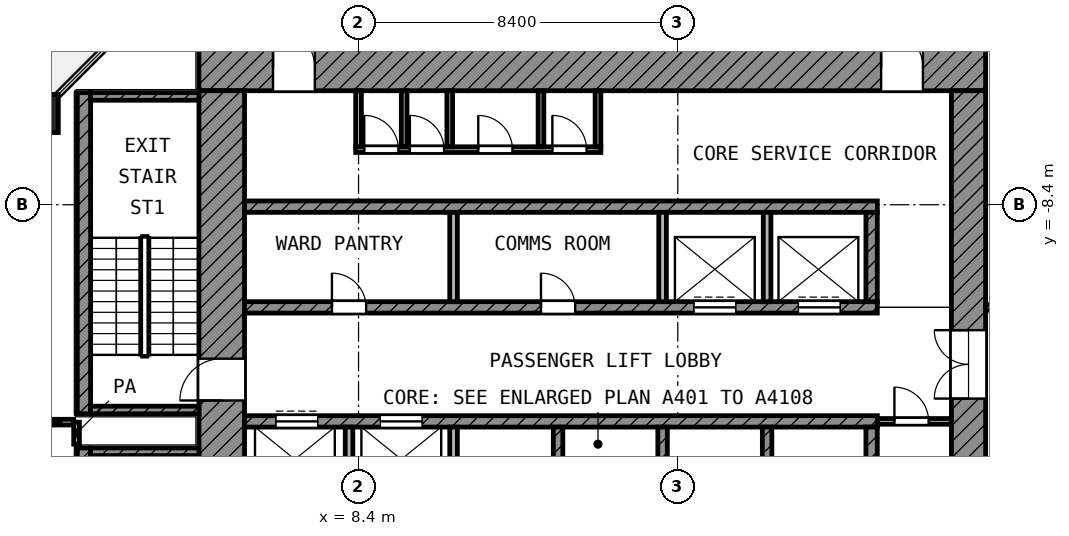
"""IFC4 building model, lengths in metres.
Left out: names, types, materials, properties, quantities, classifications, styles, units other than length and angle.
Written with IfcOpenShell. Run it as: python <this file> out.ifc"""

import sys

from ifc_helpers import new_model, si_unit, direction, frame, frame_2d, origin, origin_2d, place, context, subcontext, project, spatial, rectangle, extrude, element, fill, save


model = new_model("IFC4")
c1 = context("Model", 3, precision=1e-05, world=origin(), true_north=direction((0.0, 1.0)))
c2 = subcontext(c1, "Body", "Model", "MODEL_VIEW")
j1 = project(units=[si_unit("LENGTHUNIT", "METRE"), si_unit("PLANEANGLEUNIT", "RADIAN")], contexts=[c1])
p1 = place(None, origin())
s1 = spatial("IfcSite", under=j1, at=p1, CompositionType="ELEMENT")
p2 = place(p1, origin())
s2 = spatial("IfcBuilding", under=s1, at=p2, CompositionType="ELEMENT")
p3 = place(p2, frame((0.0, 0.0, 183.6)))
s3 = spatial("IfcBuildingStorey", under=s2, at=p3, CompositionType="ELEMENT", Elevation=183.6)
p4 = place(p3, frame((0.0, -6.0, 0.0), z_axis=(0.0, 0.0, 1.0), x_axis=(1.0, 0.0, 0.0)))
e1 = element("IfcColumn", 1, at=p4, inside=s3, PredefinedType="COLUMN", context=c2, shape_type="SweptSolid", body=[
    extrude(rectangle(XDim=1.0, YDim=1.0, at=origin_2d()), origin(), (0.0, 0.0, 1.0), 4.2),
])
p5 = place(p3, frame((4.2, -4.8, 0.0), z_axis=(0.0, 0.0, 1.0), x_axis=(1.0, 0.0, 0.0)))
e2 = element("IfcWall", 2, at=p5, inside=s3, PredefinedType="SHEAR", context=c2, shape_type="SweptSolid", body=[
    extrude(rectangle(XDim=20.7, YDim=1.2, at=frame_2d((10.35, 0.0))), origin(), (0.0, 0.0, 1.0), 3.6),
])
p6 = place(p5, frame((1.95, 0.0, 0.0)))
e3 = element("IfcOpeningElement", 3, at=p6, cuts=e2, PredefinedType="OPENING", context=c2, shape_type="SweptSolid", body=[
    extrude(rectangle(XDim=1.1, YDim=2.1, at=frame_2d((0.55, 1.05))), frame((0.0, 0.61, 0.0), z_axis=(0.0, -1.0, 0.0), x_axis=(1.0, 0.0, 0.0)), (0.0, 0.0, 1.0), 1.22),
])
p7 = place(p5, frame((17.95, 0.0, 0.0)))
e4 = element("IfcOpeningElement", 4, at=p7, cuts=e2, PredefinedType="OPENING", context=c2, shape_type="SweptSolid", body=[
    extrude(rectangle(XDim=1.1, YDim=2.1, at=frame_2d((0.55, 1.05))), frame((0.0, 0.61, 0.0), z_axis=(0.0, -1.0, 0.0), x_axis=(1.0, 0.0, 0.0)), (0.0, 0.0, 1.0), 1.22),
])
p8 = place(p3, frame((4.8, -24.9, 0.0), z_axis=(0.0, 0.0, 1.0), x_axis=(0.0, 1.0, 0.0)))
e5 = element("IfcWall", 5, at=p8, inside=s3, PredefinedType="SHEAR", context=c2, shape_type="SweptSolid", body=[
    extrude(rectangle(XDim=19.5, YDim=1.2, at=frame_2d((9.75, 0.0))), origin(), (0.0, 0.0, 1.0), 3.6),
])
p9 = place(p8, frame((11.35, 0.0, 0.0)))
e6 = element("IfcOpeningElement", 6, at=p9, cuts=e5, PredefinedType="OPENING", context=c2, shape_type="SweptSolid", body=[
    extrude(rectangle(XDim=1.1, YDim=2.1, at=frame_2d((0.55, 1.05))), frame((0.0, 0.61, 0.0), z_axis=(0.0, -1.0, 0.0), x_axis=(1.0, 0.0, 0.0)), (0.0, 0.0, 1.0), 1.22),
])
p10 = place(p8, frame((2.05, 0.0, 0.0)))
e7 = element("IfcOpeningElement", 7, at=p10, cuts=e5, PredefinedType="OPENING", context=c2, shape_type="SweptSolid", body=[
    extrude(rectangle(XDim=1.1, YDim=2.1, at=frame_2d((0.55, 1.05))), frame((0.0, 0.61, 0.0), z_axis=(0.0, -1.0, 0.0), x_axis=(1.0, 0.0, 0.0)), (0.0, 0.0, 1.0), 1.22),
])
p11 = place(p3, frame((24.45, -24.0, 0.0), z_axis=(0.0, 0.0, 1.0), x_axis=(0.0, 1.0, 0.0)))
e8 = element("IfcWall", 8, at=p11, inside=s3, PredefinedType="SHEAR", context=c2, shape_type="SweptSolid", body=[
    extrude(rectangle(XDim=18.6, YDim=0.9, at=frame_2d((9.3, 0.0))), origin(), (0.0, 0.0, 1.0), 3.6),
])
p12 = place(p11, frame((10.5, 0.0, 0.0)))
e9 = element("IfcOpeningElement", 9, at=p12, cuts=e8, PredefinedType="OPENING", context=c2, shape_type="SweptSolid", body=[
    extrude(rectangle(XDim=1.8, YDim=2.1, at=frame_2d((0.9, 1.05))), frame((0.0, 0.46, 0.0), z_axis=(0.0, -1.0, 0.0), x_axis=(1.0, 0.0, 0.0)), (0.0, 0.0, 1.0), 0.92),
])
p13 = place(p3, frame((5.4, -8.45, 0.0), z_axis=(0.0, 0.0, 1.0), x_axis=(1.0, 0.0, 0.0)))
e10 = element("IfcWall", 10, at=p13, inside=s3, PredefinedType="SHEAR", context=c2, shape_type="SweptSolid", body=[
    extrude(rectangle(XDim=16.65, YDim=0.3, at=frame_2d((8.325, 0.0))), origin(), (0.0, 0.0, 1.0), 3.6),
])
p14 = place(p3, frame((5.4, -11.1, 0.0), z_axis=(0.0, 0.0, 1.0), x_axis=(1.0, 0.0, 0.0)))
e11 = element("IfcWall", 11, at=p14, inside=s3, PredefinedType="SHEAR", context=c2, shape_type="SweptSolid", body=[
    extrude(rectangle(XDim=16.65, YDim=0.3, at=frame_2d((8.325, 0.0))), origin(), (0.0, 0.0, 1.0), 3.6),
])
p15 = place(p14, frame((11.825, 0.0, 0.0)))
e12 = element("IfcOpeningElement", 12, at=p15, cuts=e11, PredefinedType="OPENING", context=c2, shape_type="SweptSolid", body=[
    extrude(rectangle(XDim=1.1, YDim=2.1, at=frame_2d((0.55, 1.05))), frame((0.0, 0.16, 0.0), z_axis=(0.0, -1.0, 0.0), x_axis=(1.0, 0.0, 0.0)), (0.0, 0.0, 1.0), 0.32),
])
p16 = place(p14, frame((14.575, 0.0, 0.0)))
e13 = element("IfcOpeningElement", 13, at=p16, cuts=e11, PredefinedType="OPENING", context=c2, shape_type="SweptSolid", body=[
    extrude(rectangle(XDim=1.1, YDim=2.1, at=frame_2d((0.55, 1.05))), frame((0.0, 0.16, 0.0), z_axis=(0.0, -1.0, 0.0), x_axis=(1.0, 0.0, 0.0)), (0.0, 0.0, 1.0), 0.32),
])
p17 = place(p14, frame((2.3, 0.0, 0.0)))
e14 = element("IfcOpeningElement", 14, at=p17, cuts=e11, PredefinedType="OPENING", context=c2, shape_type="SweptSolid", body=[
    extrude(rectangle(XDim=0.9, YDim=2.1, at=frame_2d((0.45, 1.05))), frame((0.0, 0.16, 0.0), z_axis=(0.0, -1.0, 0.0), x_axis=(1.0, 0.0, 0.0)), (0.0, 0.0, 1.0), 0.32),
])
p18 = place(p14, frame((7.8, 0.0, 0.0)))
e15 = element("IfcOpeningElement", 15, at=p18, cuts=e11, PredefinedType="OPENING", context=c2, shape_type="SweptSolid", body=[
    extrude(rectangle(XDim=0.9, YDim=2.1, at=frame_2d((0.45, 1.05))), frame((0.0, 0.16, 0.0), z_axis=(0.0, -1.0, 0.0), x_axis=(1.0, 0.0, 0.0)), (0.0, 0.0, 1.0), 0.32),
])
p19 = place(p3, frame((5.4, -14.1, 0.0), z_axis=(0.0, 0.0, 1.0), x_axis=(1.0, 0.0, 0.0)))
e16 = element("IfcWall", 16, at=p19, inside=s3, PredefinedType="SHEAR", context=c2, shape_type="SweptSolid", body=[
    extrude(rectangle(XDim=16.65, YDim=0.3, at=frame_2d((8.325, 0.0))), origin(), (0.0, 0.0, 1.0), 3.6),
])
p20 = place(p19, frame((0.825, 0.0, 0.0)))
e17 = element("IfcOpeningElement", 17, at=p20, cuts=e16, PredefinedType="OPENING", context=c2, shape_type="SweptSolid", body=[
    extrude(rectangle(XDim=1.1, YDim=2.1, at=frame_2d((0.55, 1.05))), frame((0.0, 0.16, 0.0), z_axis=(0.0, -1.0, 0.0), x_axis=(1.0, 0.0, 0.0)), (0.0, 0.0, 1.0), 0.32),
])
p21 = place(p19, frame((3.575, 0.0, 0.0)))
e18 = element("IfcOpeningElement", 18, at=p21, cuts=e16, PredefinedType="OPENING", context=c2, shape_type="SweptSolid", body=[
    extrude(rectangle(XDim=1.1, YDim=2.1, at=frame_2d((0.55, 1.05))), frame((0.0, 0.16, 0.0), z_axis=(0.0, -1.0, 0.0), x_axis=(1.0, 0.0, 0.0)), (0.0, 0.0, 1.0), 0.32),
])
p22 = place(p3, frame((21.9, -10.95, 0.0), z_axis=(0.0, 0.0, 1.0), x_axis=(0.0, 1.0, 0.0)))
e19 = element("IfcWall", 19, at=p22, inside=s3, PredefinedType="SHEAR", context=c2, shape_type="SweptSolid", body=[
    extrude(rectangle(XDim=2.35, YDim=0.3, at=frame_2d((1.175, 0.0))), origin(), (0.0, 0.0, 1.0), 3.6),
])
p23 = place(p3, frame((21.9, -16.6, 0.0), z_axis=(0.0, 0.0, 1.0), x_axis=(0.0, 1.0, 0.0)))
e20 = element("IfcWall", 20, at=p23, inside=s3, PredefinedType="SHEAR", context=c2, shape_type="SweptSolid", body=[
    extrude(rectangle(XDim=2.35, YDim=0.3, at=frame_2d((1.175, 0.0))), origin(), (0.0, 0.0, 1.0), 3.6),
])
for number, where, z_axis, x_axis in (
    (21, (10.9, -10.95, 0.0), (0.0, 0.0, 1.0), (0.0, 1.0, 0.0)),
    (22, (16.4, -10.95, 0.0), (0.0, 0.0, 1.0), (0.0, 1.0, 0.0)),
    (23, (19.15, -10.95, 0.0), (0.0, 0.0, 1.0), (0.0, 1.0, 0.0)),
):
    element("IfcWall", number, at=place(p3, frame(where, z_axis=z_axis, x_axis=x_axis)), inside=s3, PredefinedType="PARTITIONING", context=c2, shape_type="SweptSolid", body=[
        extrude(rectangle(XDim=2.35, YDim=0.2, at=frame_2d((1.175, 0.0))), origin(), (0.0, 0.0, 1.0), 3.6),
    ])
for number, where, z_axis, x_axis in (
    (24, (8.15, -16.6, 0.0), (0.0, 0.0, 1.0), (0.0, 1.0, 0.0)),
    (25, (10.9, -16.6, 0.0), (0.0, 0.0, 1.0), (0.0, 1.0, 0.0)),
):
    element("IfcWall", number, at=place(p3, frame(where, z_axis=z_axis, x_axis=x_axis)), inside=s3, PredefinedType="PARTITIONING", context=c2, shape_type="SweptSolid", body=[
        extrude(rectangle(XDim=2.35, YDim=0.2, at=frame_2d((1.175, 0.0))), origin(), (0.0, 0.0, 1.0), 3.6),
    ])
for number, where, z_axis, x_axis in (
    (26, (13.65, -16.6, 0.0), (0.0, 0.0, 1.0), (0.0, 1.0, 0.0)),
    (27, (16.4, -16.6, 0.0), (0.0, 0.0, 1.0), (0.0, 1.0, 0.0)),
    (28, (19.15, -16.6, 0.0), (0.0, 0.0, 1.0), (0.0, 1.0, 0.0)),
):
    element("IfcWall", number, at=place(p3, frame(where, z_axis=z_axis, x_axis=x_axis)), inside=s3, PredefinedType="SHEAR", context=c2, shape_type="SweptSolid", body=[
        extrude(rectangle(XDim=2.35, YDim=0.25, at=frame_2d((1.175, 0.0))), origin(), (0.0, 0.0, 1.0), 3.6),
    ])
p24 = place(p3, frame((22.05, -14.1, 0.0), z_axis=(0.0, 0.0, 1.0), x_axis=(1.0, 0.0, 0.0)))
e29 = element("IfcWall", 29, at=p24, inside=s3, PredefinedType="PARTITIONING", context=c2, shape_type="SweptSolid", body=[
    extrude(rectangle(XDim=1.95, YDim=0.15, at=frame_2d((0.975, 0.0))), origin(), (0.0, 0.0, 1.0), 3.6),
])
p25 = place(p24, frame((0.45, 0.0, 0.0)))
e30 = element("IfcOpeningElement", 30, at=p25, cuts=e29, PredefinedType="OPENING", context=c2, shape_type="SweptSolid", body=[
    extrude(rectangle(XDim=0.9, YDim=2.1, at=frame_2d((0.45, 1.05))), frame((0.0, 0.085, 0.0), z_axis=(0.0, -1.0, 0.0), x_axis=(1.0, 0.0, 0.0)), (0.0, 0.0, 1.0), 0.17),
])
p26 = place(p3, frame((8.325, -6.95, 0.0), z_axis=(0.0, 0.0, 1.0), x_axis=(1.0, 0.0, 0.0)))
e31 = element("IfcWall", 31, at=p26, inside=s3, PredefinedType="PARTITIONING", context=c2, shape_type="SweptSolid", body=[
    extrude(rectangle(XDim=6.45, YDim=0.15, at=frame_2d((3.225, 0.0))), origin(), (0.0, 0.0, 1.0), 3.6),
])
p27 = place(p26, frame((0.225, 0.0, 0.0)))
e32 = element("IfcOpeningElement", 32, at=p27, cuts=e31, PredefinedType="OPENING", context=c2, shape_type="SweptSolid", body=[
    extrude(rectangle(XDim=0.9, YDim=2.1, at=frame_2d((0.45, 1.05))), frame((0.0, 0.085, 0.0), z_axis=(0.0, -1.0, 0.0), x_axis=(1.0, 0.0, 0.0)), (0.0, 0.0, 1.0), 0.17),
])
p28 = place(p26, frame((1.425, 0.0, 0.0)))
e33 = element("IfcOpeningElement", 33, at=p28, cuts=e31, PredefinedType="OPENING", context=c2, shape_type="SweptSolid", body=[
    extrude(rectangle(XDim=0.9, YDim=2.1, at=frame_2d((0.45, 1.05))), frame((0.0, 0.085, 0.0), z_axis=(0.0, -1.0, 0.0), x_axis=(1.0, 0.0, 0.0)), (0.0, 0.0, 1.0), 0.17),
])
p29 = place(p26, frame((3.225, 0.0, 0.0)))
e34 = element("IfcOpeningElement", 34, at=p29, cuts=e31, PredefinedType="OPENING", context=c2, shape_type="SweptSolid", body=[
    extrude(rectangle(XDim=0.9, YDim=2.1, at=frame_2d((0.45, 1.05))), frame((0.0, 0.085, 0.0), z_axis=(0.0, -1.0, 0.0), x_axis=(1.0, 0.0, 0.0)), (0.0, 0.0, 1.0), 0.17),
])
p30 = place(p26, frame((5.175, 0.0, 0.0)))
e35 = element("IfcOpeningElement", 35, at=p30, cuts=e31, PredefinedType="OPENING", context=c2, shape_type="SweptSolid", body=[
    extrude(rectangle(XDim=0.9, YDim=2.1, at=frame_2d((0.45, 1.05))), frame((0.0, 0.085, 0.0), z_axis=(0.0, -1.0, 0.0), x_axis=(1.0, 0.0, 0.0)), (0.0, 0.0, 1.0), 0.17),
])
for number, where, z_axis, x_axis in (
    (36, (8.4, -6.875, 0.0), (0.0, 0.0, 1.0), (0.0, 1.0, 0.0)),
    (37, (9.6, -6.875, 0.0), (0.0, 0.0, 1.0), (0.0, 1.0, 0.0)),
    (38, (10.8, -6.875, 0.0), (0.0, 0.0, 1.0), (0.0, 1.0, 0.0)),
    (39, (13.2, -6.875, 0.0), (0.0, 0.0, 1.0), (0.0, 1.0, 0.0)),
    (40, (14.7, -6.875, 0.0), (0.0, 0.0, 1.0), (0.0, 1.0, 0.0)),
):
    element("IfcWall", number, at=place(p3, frame(where, z_axis=z_axis, x_axis=x_axis)), inside=s3, PredefinedType="PARTITIONING", context=c2, shape_type="SweptSolid", body=[
        extrude(rectangle(XDim=1.475, YDim=0.15, at=frame_2d((0.738, 0.0))), origin(), (0.0, 0.0, 1.0), 3.6),
    ])
p31 = place(p3, frame((1.175, -13.9, 0.0), z_axis=(0.0, 0.0, 1.0), x_axis=(0.0, 1.0, 0.0)))
e41 = element("IfcWall", 41, at=p31, inside=s3, PredefinedType="SHEAR", context=c2, shape_type="SweptSolid", body=[
    extrude(rectangle(XDim=8.45, YDim=0.35, at=frame_2d((4.225, 0.0))), origin(), (0.0, 0.0, 1.0), 3.6),
])
for number, where, z_axis, x_axis in (
    (42, (1.35, -5.55, 0.0), (0.0, 0.0, 1.0), (1.0, 0.0, 0.0)),
    (43, (1.35, -13.8, 0.0), (0.0, 0.0, 1.0), (1.0, 0.0, 0.0)),
):
    element("IfcWall", number, at=place(p3, frame(where, z_axis=z_axis, x_axis=x_axis)), inside=s3, PredefinedType="SHEAR", context=c2, shape_type="SweptSolid", body=[
        extrude(rectangle(XDim=2.85, YDim=0.2, at=frame_2d((1.425, 0.0))), origin(), (0.0, 0.0, 1.0), 3.6),
    ])
p32 = place(p3, frame((1.175, -23.25, 0.0), z_axis=(0.0, 0.0, 1.0), x_axis=(0.0, 1.0, 0.0)))
e44 = element("IfcWall", 44, at=p32, inside=s3, PredefinedType="SHEAR", context=c2, shape_type="SweptSolid", body=[
    extrude(rectangle(XDim=8.45, YDim=0.35, at=frame_2d((4.225, 0.0))), origin(), (0.0, 0.0, 1.0), 3.6),
])
p33 = place(p3, frame((1.35, -14.9, 0.0), z_axis=(0.0, 0.0, 1.0), x_axis=(1.0, 0.0, 0.0)))
e45 = element("IfcWall", 45, at=p33, inside=s3, PredefinedType="SHEAR", context=c2, shape_type="SweptSolid", body=[
    extrude(rectangle(XDim=2.85, YDim=0.2, at=frame_2d((1.425, 0.0))), origin(), (0.0, 0.0, 1.0), 3.6),
])
p34 = place(p3, frame((0.08, -14.12, 0.0), z_axis=(0.0, 0.0, 1.0), x_axis=(1.0, 0.0, 0.0)))
e46 = element("IfcWall", 46, at=p34, inside=s3, PredefinedType="PARTITIONING", context=c2, shape_type="SweptSolid", body=[
    extrude(rectangle(XDim=0.824, YDim=0.15, at=frame_2d((0.412, 0.0))), origin(), (0.0, 0.0, 1.0), 3.6),
])
p35 = place(p3, frame((24.9, -11.1, 0.0), z_axis=(0.0, 0.0, 1.0), x_axis=(1.0, 0.0, 0.0)))
e47 = element("IfcWall", 47, at=p35, inside=s3, PredefinedType="PARTITIONING", context=c2, shape_type="SweptSolid", body=[
    extrude(rectangle(XDim=4.424, YDim=0.15, at=frame_2d((2.212, 0.0))), origin(), (0.0, 0.0, 1.0), 3.6),
])
p36 = place(p35, frame((1.8, 0.0, 0.0)))
e48 = element("IfcOpeningElement", 48, at=p36, cuts=e47, PredefinedType="OPENING", context=c2, shape_type="SweptSolid", body=[
    extrude(rectangle(XDim=1.2, YDim=2.1, at=frame_2d((0.6, 1.05))), frame((0.0, 0.085, 0.0), z_axis=(0.0, -1.0, 0.0), x_axis=(1.0, 0.0, 0.0)), (0.0, 0.0, 1.0), 0.17),
])
p37 = place(p3, frame((0.98, -14.7, 0.0), z_axis=(0.0, 0.0, 1.0), x_axis=(0.0, 1.0, 0.0)))
e49 = element("IfcWall", 49, at=p37, inside=s3, PredefinedType="PARTITIONING", context=c2, shape_type="SweptSolid", body=[
    extrude(rectangle(XDim=0.578, YDim=0.15, at=frame_2d((0.289, 0.0))), origin(), (0.0, 0.0, 1.0), 3.6),
])
p38 = place(p15, origin())
e50 = element("IfcDoor", 50, at=p38, inside=s3, OperationType="DOUBLE_DOOR_SLIDING", PredefinedType="DOOR", context=c2, shape_type="SweptSolid", body=[
    extrude(rectangle(XDim=1.1, YDim=2.1, at=frame_2d((0.55, 1.05))), frame((0.0, 0.025, 0.0), z_axis=(0.0, -1.0, 0.0), x_axis=(1.0, 0.0, 0.0)), (0.0, 0.0, 1.0), 0.05),
])
fill(e12, e50)
p39 = place(p16, origin())
e51 = element("IfcDoor", 51, at=p39, inside=s3, OperationType="DOUBLE_DOOR_SLIDING", PredefinedType="DOOR", context=c2, shape_type="SweptSolid", body=[
    extrude(rectangle(XDim=1.1, YDim=2.1, at=frame_2d((0.55, 1.05))), frame((0.0, 0.025, 0.0), z_axis=(0.0, -1.0, 0.0), x_axis=(1.0, 0.0, 0.0)), (0.0, 0.0, 1.0), 0.05),
])
fill(e13, e51)
p40 = place(p20, origin())
e52 = element("IfcDoor", 52, at=p40, inside=s3, OperationType="DOUBLE_DOOR_SLIDING", PredefinedType="DOOR", context=c2, shape_type="SweptSolid", body=[
    extrude(rectangle(XDim=1.1, YDim=2.1, at=frame_2d((0.55, 1.05))), frame((0.0, 0.025, 0.0), z_axis=(0.0, -1.0, 0.0), x_axis=(1.0, 0.0, 0.0)), (0.0, 0.0, 1.0), 0.05),
])
fill(e17, e52)
p41 = place(p21, origin())
e53 = element("IfcDoor", 53, at=p41, inside=s3, OperationType="DOUBLE_DOOR_SLIDING", PredefinedType="DOOR", context=c2, shape_type="SweptSolid", body=[
    extrude(rectangle(XDim=1.1, YDim=2.1, at=frame_2d((0.55, 1.05))), frame((0.0, 0.025, 0.0), z_axis=(0.0, -1.0, 0.0), x_axis=(1.0, 0.0, 0.0)), (0.0, 0.0, 1.0), 0.05),
])
fill(e18, e53)
p42 = place(p9, origin())
e54 = element("IfcDoor", 54, at=p42, inside=s3, OperationType="SINGLE_SWING_LEFT", PredefinedType="DOOR", context=c2, shape_type="SweptSolid", body=[
    extrude(rectangle(XDim=1.1, YDim=2.1, at=frame_2d((0.55, 1.05))), frame((0.0, 0.025, 0.0), z_axis=(0.0, -1.0, 0.0), x_axis=(1.0, 0.0, 0.0)), (0.0, 0.0, 1.0), 0.05),
])
fill(e6, e54)
p43 = place(p6, origin())
e55 = element("IfcDoor", 55, at=p43, inside=s3, OperationType="SINGLE_SWING_LEFT", PredefinedType="DOOR", context=c2, shape_type="SweptSolid", body=[
    extrude(rectangle(XDim=1.1, YDim=2.1, at=frame_2d((0.55, 1.05))), frame((0.0, 0.025, 0.0), z_axis=(0.0, -1.0, 0.0), x_axis=(1.0, 0.0, 0.0)), (0.0, 0.0, 1.0), 0.05),
])
fill(e3, e55)
p44 = place(p7, origin())
e56 = element("IfcDoor", 56, at=p44, inside=s3, OperationType="SINGLE_SWING_LEFT", PredefinedType="DOOR", context=c2, shape_type="SweptSolid", body=[
    extrude(rectangle(XDim=1.1, YDim=2.1, at=frame_2d((0.55, 1.05))), frame((0.0, 0.025, 0.0), z_axis=(0.0, -1.0, 0.0), x_axis=(1.0, 0.0, 0.0)), (0.0, 0.0, 1.0), 0.05),
])
fill(e4, e56)
p45 = place(p12, origin())
e57 = element("IfcDoor", 57, at=p45, inside=s3, OperationType="DOUBLE_DOOR_SINGLE_SWING", PredefinedType="DOOR", context=c2, shape_type="SweptSolid", body=[
    extrude(rectangle(XDim=1.8, YDim=2.1, at=frame_2d((0.9, 1.05))), frame((0.0, 0.025, 0.0), z_axis=(0.0, -1.0, 0.0), x_axis=(1.0, 0.0, 0.0)), (0.0, 0.0, 1.0), 0.05),
])
fill(e9, e57)
p46 = place(p27, origin())
e58 = element("IfcDoor", 58, at=p46, inside=s3, OperationType="SINGLE_SWING_LEFT", PredefinedType="DOOR", context=c2, shape_type="SweptSolid", body=[
    extrude(rectangle(XDim=0.9, YDim=2.1, at=frame_2d((0.45, 1.05))), frame((0.0, 0.025, 0.0), z_axis=(0.0, -1.0, 0.0), x_axis=(1.0, 0.0, 0.0)), (0.0, 0.0, 1.0), 0.05),
])
fill(e32, e58)
p47 = place(p28, origin())
e59 = element("IfcDoor", 59, at=p47, inside=s3, OperationType="SINGLE_SWING_LEFT", PredefinedType="DOOR", context=c2, shape_type="SweptSolid", body=[
    extrude(rectangle(XDim=0.9, YDim=2.1, at=frame_2d((0.45, 1.05))), frame((0.0, 0.025, 0.0), z_axis=(0.0, -1.0, 0.0), x_axis=(1.0, 0.0, 0.0)), (0.0, 0.0, 1.0), 0.05),
])
fill(e33, e59)
p48 = place(p29, origin())
e60 = element("IfcDoor", 60, at=p48, inside=s3, OperationType="SINGLE_SWING_LEFT", PredefinedType="DOOR", context=c2, shape_type="SweptSolid", body=[
    extrude(rectangle(XDim=0.9, YDim=2.1, at=frame_2d((0.45, 1.05))), frame((0.0, 0.025, 0.0), z_axis=(0.0, -1.0, 0.0), x_axis=(1.0, 0.0, 0.0)), (0.0, 0.0, 1.0), 0.05),
])
fill(e34, e60)
p49 = place(p30, origin())
e61 = element("IfcDoor", 61, at=p49, inside=s3, OperationType="SINGLE_SWING_LEFT", PredefinedType="DOOR", context=c2, shape_type="SweptSolid", body=[
    extrude(rectangle(XDim=0.9, YDim=2.1, at=frame_2d((0.45, 1.05))), frame((0.0, 0.025, 0.0), z_axis=(0.0, -1.0, 0.0), x_axis=(1.0, 0.0, 0.0)), (0.0, 0.0, 1.0), 0.05),
])
fill(e35, e61)
p50 = place(p25, origin())
e62 = element("IfcDoor", 62, at=p50, inside=s3, OperationType="SINGLE_SWING_LEFT", PredefinedType="DOOR", context=c2, shape_type="SweptSolid", body=[
    extrude(rectangle(XDim=0.9, YDim=2.1, at=frame_2d((0.45, 1.05))), frame((0.0, 0.025, 0.0), z_axis=(0.0, -1.0, 0.0), x_axis=(1.0, 0.0, 0.0)), (0.0, 0.0, 1.0), 0.05),
])
fill(e30, e62)
p51 = place(p17, origin())
e63 = element("IfcDoor", 63, at=p51, inside=s3, OperationType="SINGLE_SWING_LEFT", PredefinedType="DOOR", context=c2, shape_type="SweptSolid", body=[
    extrude(rectangle(XDim=0.9, YDim=2.1, at=frame_2d((0.45, 1.05))), frame((0.0, 0.025, 0.0), z_axis=(0.0, -1.0, 0.0), x_axis=(1.0, 0.0, 0.0)), (0.0, 0.0, 1.0), 0.05),
])
fill(e14, e63)
p52 = place(p18, origin())
e64 = element("IfcDoor", 64, at=p52, inside=s3, OperationType="SINGLE_SWING_LEFT", PredefinedType="DOOR", context=c2, shape_type="SweptSolid", body=[
    extrude(rectangle(XDim=0.9, YDim=2.1, at=frame_2d((0.45, 1.05))), frame((0.0, 0.025, 0.0), z_axis=(0.0, -1.0, 0.0), x_axis=(1.0, 0.0, 0.0)), (0.0, 0.0, 1.0), 0.05),
])
fill(e15, e64)
save(model, sys.argv[1])
